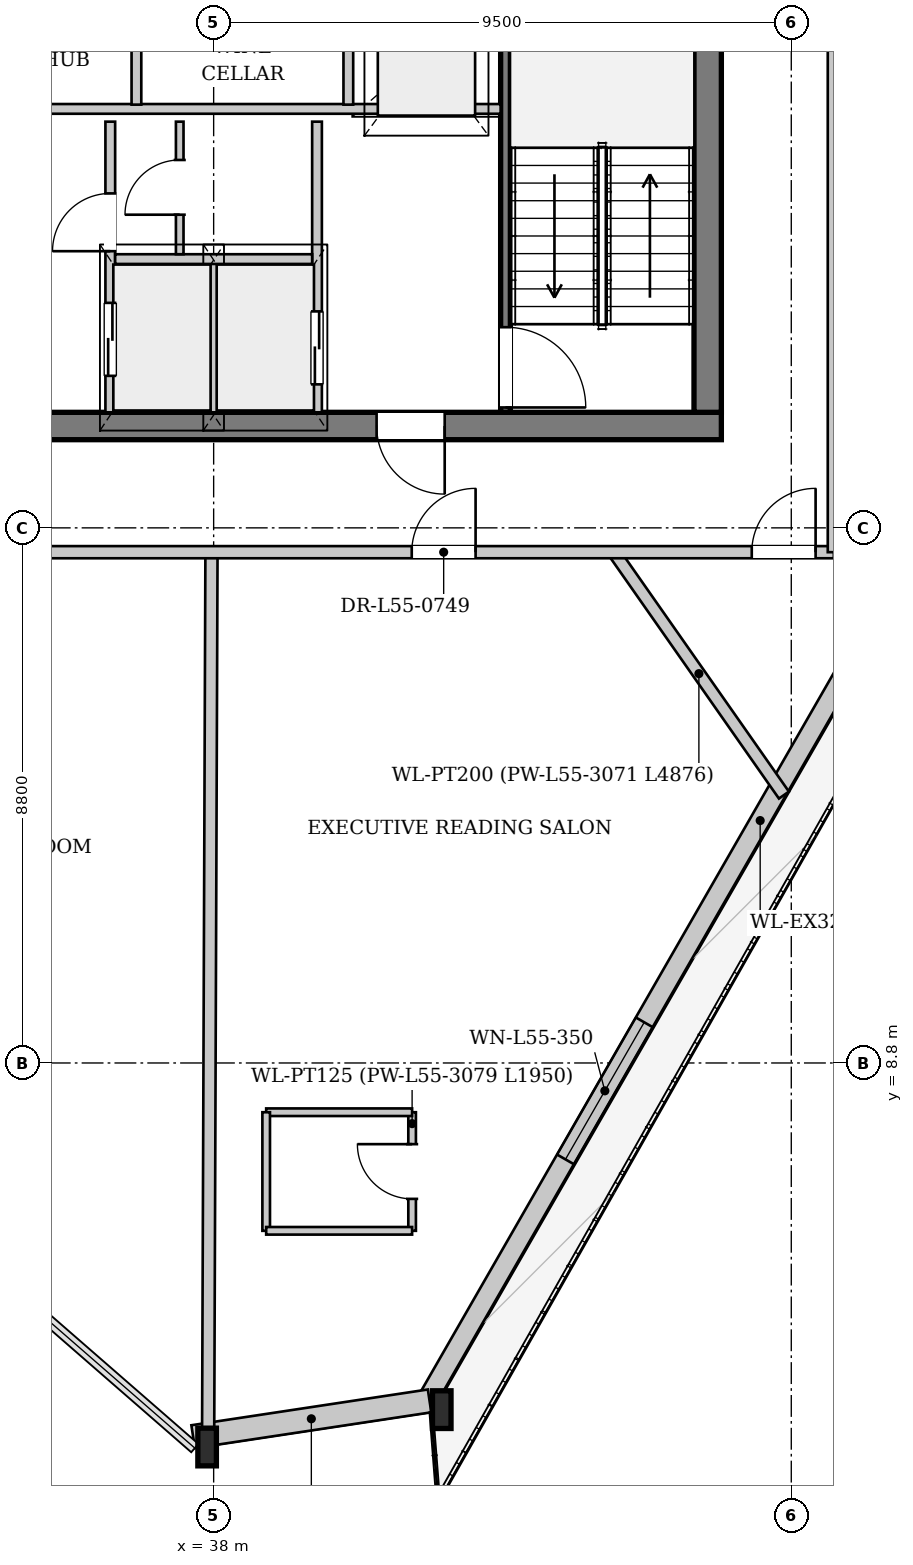
"""IFC4 building model, lengths in metres.
Left out: names, types, materials, properties, quantities, classifications, styles, units other than length and angle.
Written with IfcOpenShell. Run it as: python <this file> out.ifc"""

import sys

from ifc_helpers import new_model, si_unit, direction, frame, frame_2d, origin, origin_2d, place, context, subcontext, project, spatial, rectangle, i_section, extrude, source, transform, mapped, element, fill, save


model = new_model("IFC4")
c1 = context("Model", 3, precision=1e-05, world=origin(), true_north=direction((0.0, 1.0)))
c2 = subcontext(c1, "Body", "Model", "MODEL_VIEW")
j1 = project(units=[si_unit("LENGTHUNIT", "METRE"), si_unit("PLANEANGLEUNIT", "RADIAN")], contexts=[c1])
p1 = place(None, origin())
s1 = spatial("IfcSite", under=j1, at=p1, CompositionType="ELEMENT")
p2 = place(p1, origin())
s2 = spatial("IfcBuilding", under=s1, at=p2, CompositionType="ELEMENT")
p3 = place(p2, frame((0.0, 0.0, 209.6)))
s3 = spatial("IfcBuildingStorey", under=s2, at=p3, CompositionType="ELEMENT", Elevation=209.6)
m1 = source(origin(), c2, "Body", "SweptSolid", [
    extrude(i_section(OverallWidth=0.305, OverallDepth=0.62, WebThickness=0.021, FlangeThickness=0.04, at=origin_2d()), origin(), (0.0, 0.0, 1.0), 3.409),
])
p4 = place(p3, frame((37.691, 2.467, 0.0), z_axis=(0.118446662085, 0.010598613052, 0.992903851157), x_axis=(-0.089123966209, 0.996020541278, 0.0)))
e1 = element("IfcColumn", 1, at=p4, inside=s3, PredefinedType="COLUMN", context=c2, shape_type="MappedRepresentation", body=[
    mapped(m1, transform((0.0, 0.0, 0.0), x_axis=(1.0, 0.0, 0.0), y_axis=(0.0, 1.0, 0.0), z_axis=(0.0, 0.0, 1.0), scale=1.0)),
])
m2 = source(origin(), c2, "Body", "SweptSolid", [
    extrude(i_section(OverallWidth=0.305, OverallDepth=0.62, WebThickness=0.021, FlangeThickness=0.04, at=origin_2d()), origin(), (0.0, 0.0, 1.0), 3.404),
])
p5 = place(p3, frame((41.58, 3.055, 0.0), z_axis=(0.100996805181, 0.026038238836, 0.994545954424), x_axis=(-0.249649213063, 0.968336341576, 0.0)))
e2 = element("IfcColumn", 2, at=p5, inside=s3, PredefinedType="COLUMN", context=c2, shape_type="MappedRepresentation", body=[
    mapped(m2, transform((0.0, 0.0, 0.0), x_axis=(1.0, 0.0, 0.0), y_axis=(0.0, 1.0, 0.0), z_axis=(0.0, 0.0, 1.0), scale=1.0)),
])
p6 = place(p3, frame((52.953, 23.164, 0.0), z_axis=(0.0, 0.0, 1.0), x_axis=(-0.498307707731, -0.867000247068, 0.0)))
e3 = element("IfcWall", 3, at=p6, inside=s3, PredefinedType="SOLIDWALL", context=c2, shape_type="SweptSolid", body=[
    extrude(rectangle(XDim=23.102, YDim=0.32, at=frame_2d((11.551, 0.0))), origin(), (0.0, 0.0, 1.0), 2.822),
])
p7 = place(p6, frame((6.643, 0.0, 0.0)))
e4 = element("IfcOpeningElement", 4, at=p7, cuts=e3, PredefinedType="OPENING", context=c2, shape_type="SweptSolid", body=[
    extrude(rectangle(XDim=1.5, YDim=2.3, at=frame_2d((0.75, 1.15))), frame((0.0, 0.17, 0.0), z_axis=(0.0, -1.0, 0.0), x_axis=(1.0, 0.0, 0.0)), (0.0, 0.0, 1.0), 0.34),
])
p8 = place(p6, frame((15.796, 0.0, 0.352)))
e5 = element("IfcOpeningElement", 5, at=p8, cuts=e3, PredefinedType="OPENING", context=c2, shape_type="SweptSolid", body=[
    extrude(rectangle(XDim=2.6, YDim=2.35, at=frame_2d((1.3, 1.175))), frame((0.0, 0.17, 0.0), z_axis=(0.0, -1.0, 0.0), x_axis=(1.0, 0.0, 0.0)), (0.0, 0.0, 1.0), 0.34),
])
p9 = place(p3, frame((41.551, 3.243, 0.0), z_axis=(0.0, 0.0, 1.0), x_axis=(-0.988756700012, -0.149533234373, 0.0)))
e6 = element("IfcWall", 6, at=p9, inside=s3, PredefinedType="SOLIDWALL", context=c2, shape_type="SweptSolid", body=[
    extrude(rectangle(XDim=3.933, YDim=0.38, at=frame_2d((1.967, 0.0))), origin(), (0.0, 0.0, 1.0), 2.822),
])
p10 = place(p3, frame((46.35, 19.275, 0.0), z_axis=(0.0, 0.0, 1.0), x_axis=(-1.0, 0.0, 0.0)))
e7 = element("IfcWall", 7, at=p10, inside=s3, PredefinedType="SHEAR", context=c2, shape_type="SweptSolid", body=[
    extrude(rectangle(XDim=16.7, YDim=0.45, at=frame_2d((8.35, 0.0))), origin(), (0.0, 0.0, 1.0), 3.33),
])
p11 = place(p10, frame((4.55, 0.0, 0.0)))
e8 = element("IfcOpeningElement", 8, at=p11, cuts=e7, PredefinedType="OPENING", context=c2, shape_type="SweptSolid", body=[
    extrude(rectangle(XDim=1.12, YDim=2.25, at=frame_2d((0.56, 1.125))), frame((0.0, 0.235, 0.0), z_axis=(0.0, -1.0, 0.0), x_axis=(1.0, 0.0, 0.0)), (0.0, 0.0, 1.0), 0.47),
])
p12 = place(p10, frame((11.05, 0.0, 0.0)))
e9 = element("IfcOpeningElement", 9, at=p12, cuts=e7, PredefinedType="OPENING", context=c2, shape_type="SweptSolid", body=[
    extrude(rectangle(XDim=1.12, YDim=2.25, at=frame_2d((0.56, 1.125))), frame((0.0, 0.235, 0.0), z_axis=(0.0, -1.0, 0.0), x_axis=(1.0, 0.0, 0.0)), (0.0, 0.0, 1.0), 0.47),
])
p13 = place(p3, frame((46.125, 33.7, 0.0), z_axis=(0.0, 0.0, 1.0), x_axis=(0.0, -1.0, 0.0)))
e10 = element("IfcWall", 10, at=p13, inside=s3, PredefinedType="SHEAR", context=c2, shape_type="SweptSolid", body=[
    extrude(rectangle(XDim=14.2, YDim=0.45, at=frame_2d((7.1, 0.0))), origin(), (0.0, 0.0, 1.0), 3.33),
])
p14 = place(p13, frame((5.18, 0.0, 0.0)))
e11 = element("IfcOpeningElement", 11, at=p14, cuts=e10, PredefinedType="OPENING", context=c2, shape_type="SweptSolid", body=[
    extrude(rectangle(XDim=1.6, YDim=2.2, at=frame_2d((0.8, 1.1))), frame((0.0, 0.235, 0.0), z_axis=(0.0, -1.0, 0.0), x_axis=(1.0, 0.0, 0.0)), (0.0, 0.0, 1.0), 0.47),
])
p15 = place(p13, frame((2.05, 0.0, 0.0)))
e12 = element("IfcOpeningElement", 12, at=p15, cuts=e10, PredefinedType="OPENING", context=c2, shape_type="SweptSolid", body=[
    extrude(rectangle(XDim=0.95, YDim=2.1, at=frame_2d((0.475, 1.05))), frame((0.0, 0.235, 0.0), z_axis=(0.0, -1.0, 0.0), x_axis=(1.0, 0.0, 0.0)), (0.0, 0.0, 1.0), 0.47),
])
p16 = place(p3, frame((42.8, 26.96, 0.0), z_axis=(0.0, 0.0, 1.0), x_axis=(0.0, -1.0, 0.0)))
e13 = element("IfcWall", 13, at=p16, inside=s3, PredefinedType="PARTITIONING", context=c2, shape_type="SweptSolid", body=[
    extrude(rectangle(XDim=7.46, YDim=0.16, at=frame_2d((3.73, 0.0))), origin(), (0.0, 0.0, 1.0), 3.33),
])
p17 = place(p16, frame((6.06, 0.0, 0.0)))
e14 = element("IfcOpeningElement", 14, at=p17, cuts=e13, PredefinedType="OPENING", context=c2, shape_type="SweptSolid", body=[
    extrude(rectangle(XDim=1.32, YDim=2.2, at=frame_2d((0.66, 1.1))), frame((0.0, 0.09, 0.0), z_axis=(0.0, -1.0, 0.0), x_axis=(1.0, 0.0, 0.0)), (0.0, 0.0, 1.0), 0.18),
])
p18 = place(p3, frame((36.3, 19.5, 0.0), z_axis=(0.0, 0.0, 1.0), x_axis=(0.0, 1.0, 0.0)))
e15 = element("IfcWall", 15, at=p18, inside=s3, PredefinedType="PARTITIONING", context=c2, shape_type="SweptSolid", body=[
    extrude(rectangle(XDim=4.78, YDim=0.16, at=frame_2d((2.39, 0.0))), origin(), (0.0, 0.0, 1.0), 3.33),
])
p19 = place(p18, frame((0.6, 0.0, 0.0)))
e16 = element("IfcOpeningElement", 16, at=p19, cuts=e15, PredefinedType="OPENING", context=c2, shape_type="SweptSolid", body=[
    extrude(rectangle(XDim=1.2, YDim=2.2, at=frame_2d((0.6, 1.1))), frame((0.0, 0.09, 0.0), z_axis=(0.0, -1.0, 0.0), x_axis=(1.0, 0.0, 0.0)), (0.0, 0.0, 1.0), 0.18),
])
p20 = place(p18, frame((2.65, 0.0, 0.0)))
e17 = element("IfcOpeningElement", 17, at=p20, cuts=e15, PredefinedType="OPENING", context=c2, shape_type="SweptSolid", body=[
    extrude(rectangle(XDim=0.95, YDim=2.1, at=frame_2d((0.475, 1.05))), frame((0.0, 0.09, 0.0), z_axis=(0.0, -1.0, 0.0), x_axis=(1.0, 0.0, 0.0)), (0.0, 0.0, 1.0), 0.18),
])
p21 = place(p3, frame((39.7, 24.28, 0.0), z_axis=(0.0, 0.0, 1.0), x_axis=(0.0, -1.0, 0.0)))
e18 = element("IfcWall", 18, at=p21, inside=s3, PredefinedType="PARTITIONING", context=c2, shape_type="SweptSolid", body=[
    extrude(rectangle(XDim=4.78, YDim=0.16, at=frame_2d((2.39, 0.0))), origin(), (0.0, 0.0, 1.0), 3.33),
])
p22 = place(p21, frame((3.12, 0.0, 0.0)))
e19 = element("IfcOpeningElement", 19, at=p22, cuts=e18, PredefinedType="OPENING", context=c2, shape_type="SweptSolid", body=[
    extrude(rectangle(XDim=1.2, YDim=2.2, at=frame_2d((0.6, 1.1))), frame((0.0, 0.09, 0.0), z_axis=(0.0, -1.0, 0.0), x_axis=(1.0, 0.0, 0.0)), (0.0, 0.0, 1.0), 0.18),
])
p23 = place(p3, frame((38.0, 19.5, 0.0), z_axis=(0.0, 0.0, 1.0), x_axis=(0.0, 1.0, 0.0)))
e20 = element("IfcWall", 20, at=p23, inside=s3, PredefinedType="PARTITIONING", context=c2, shape_type="SweptSolid", body=[
    extrude(rectangle(XDim=2.46, YDim=0.125, at=frame_2d((1.23, 0.0))), origin(), (0.0, 0.0, 1.0), 3.33),
])
p24 = place(p3, frame((36.38, 22.02, 0.0), z_axis=(0.0, 0.0, 1.0), x_axis=(1.0, 0.0, 0.0)))
e21 = element("IfcWall", 21, at=p24, inside=s3, PredefinedType="PARTITIONING", context=c2, shape_type="SweptSolid", body=[
    extrude(rectangle(XDim=3.24, YDim=0.16, at=frame_2d((1.62, 0.0))), origin(), (0.0, 0.0, 1.0), 3.33),
])
p25 = place(p3, frame((33.28, 24.49, 0.0), z_axis=(0.0, 0.0, 1.0), x_axis=(1.0, 0.0, 0.0)))
e22 = element("IfcWall", 22, at=p25, inside=s3, PredefinedType="PARTITIONING", context=c2, shape_type="SweptSolid", body=[
    extrude(rectangle(XDim=9.44, YDim=0.16, at=frame_2d((4.72, 0.0))), origin(), (0.0, 0.0, 1.0), 3.33),
])
p26 = place(p3, frame((37.442, 22.1, 0.0), z_axis=(0.0, 0.0, 1.0), x_axis=(0.0, 1.0, 0.0)))
e23 = element("IfcWall", 23, at=p26, inside=s3, PredefinedType="PARTITIONING", context=c2, shape_type="SweptSolid", body=[
    extrude(rectangle(XDim=2.18, YDim=0.125, at=frame_2d((1.09, 0.0))), origin(), (0.0, 0.0, 1.0), 3.33),
])
p27 = place(p26, frame((0.65, 0.0, 0.0)))
e24 = element("IfcOpeningElement", 24, at=p27, cuts=e23, PredefinedType="OPENING", context=c2, shape_type="SweptSolid", body=[
    extrude(rectangle(XDim=0.9, YDim=2.1, at=frame_2d((0.45, 1.05))), frame((0.0, 0.073, 0.0), z_axis=(0.0, -1.0, 0.0), x_axis=(1.0, 0.0, 0.0)), (0.0, 0.0, 1.0), 0.145),
])
for number, where, z_axis, x_axis in (
    (25, (36.73, 24.56, 0.0), (0.0, 0.0, 1.0), (0.0, 1.0, 0.0)),
    (26, (40.215, 24.56, 0.0), (0.0, 0.0, 1.0), (0.0, 1.0, 0.0)),
):
    element("IfcWall", number, at=place(p3, frame(where, z_axis=z_axis, x_axis=x_axis)), inside=s3, PredefinedType="PARTITIONING", context=c2, shape_type="SweptSolid", body=[
        extrude(rectangle(XDim=2.31, YDim=0.16, at=frame_2d((1.155, 0.0))), origin(), (0.0, 0.0, 1.0), 3.33),
    ])
p28 = place(p3, frame((44.582, 17.2, 0.0), z_axis=(0.0, 0.0, 1.0), x_axis=(0.573549703619, -0.8191707621, 0.0)))
e27 = element("IfcWall", 27, at=p28, inside=s3, PredefinedType="PARTITIONING", context=c2, shape_type="SweptSolid", body=[
    extrude(rectangle(XDim=4.876, YDim=0.2, at=frame_2d((2.438, 0.0))), origin(), (0.0, 0.0, 1.0), 3.33),
])
p29 = place(p3, frame((37.964, 17.2, 0.0), z_axis=(0.0, 0.0, 1.0), x_axis=(-0.003794344368, -0.999992801449, 0.0)))
e28 = element("IfcWall", 28, at=p29, inside=s3, PredefinedType="PARTITIONING", context=c2, shape_type="SweptSolid", body=[
    extrude(rectangle(XDim=14.67, YDim=0.2, at=frame_2d((7.335, 0.0))), origin(), (0.0, 0.0, 1.0), 2.925),
])
p30 = place(p3, frame((41.264, 6.04, 0.0), z_axis=(0.0, 0.0, 1.0), x_axis=(0.0, 1.0, 0.0)))
e29 = element("IfcWall", 29, at=p30, inside=s3, PredefinedType="PARTITIONING", context=c2, shape_type="SweptSolid", body=[
    extrude(rectangle(XDim=1.95, YDim=0.125, at=frame_2d((0.975, 0.0))), origin(), (0.0, 0.0, 1.0), 2.925),
])
p31 = place(p30, frame((0.525, 0.0, 0.0)))
e30 = element("IfcOpeningElement", 30, at=p31, cuts=e29, PredefinedType="OPENING", context=c2, shape_type="SweptSolid", body=[
    extrude(rectangle(XDim=0.9, YDim=2.1, at=frame_2d((0.45, 1.05))), frame((0.0, 0.073, 0.0), z_axis=(0.0, -1.0, 0.0), x_axis=(1.0, 0.0, 0.0)), (0.0, 0.0, 1.0), 0.145),
])
p32 = place(p3, frame((41.264, 7.99, 0.0), z_axis=(0.0, 0.0, 1.0), x_axis=(-1.0, 0.0, 0.0)))
e31 = element("IfcWall", 31, at=p32, inside=s3, PredefinedType="PARTITIONING", context=c2, shape_type="SweptSolid", body=[
    extrude(rectangle(XDim=2.4, YDim=0.125, at=frame_2d((1.2, 0.0))), origin(), (0.0, 0.0, 1.0), 3.33),
])
p33 = place(p3, frame((38.864, 7.99, 0.0), z_axis=(0.0, 0.0, 1.0), x_axis=(0.0, -1.0, 0.0)))
e32 = element("IfcWall", 32, at=p33, inside=s3, PredefinedType="PARTITIONING", context=c2, shape_type="SweptSolid", body=[
    extrude(rectangle(XDim=1.95, YDim=0.125, at=frame_2d((0.975, 0.0))), origin(), (0.0, 0.0, 1.0), 3.33),
])
p34 = place(p3, frame((38.864, 6.04, 0.0), z_axis=(0.0, 0.0, 1.0), x_axis=(1.0, 0.0, 0.0)))
e33 = element("IfcWall", 33, at=p34, inside=s3, PredefinedType="PARTITIONING", context=c2, shape_type="SweptSolid", body=[
    extrude(rectangle(XDim=2.4, YDim=0.125, at=frame_2d((1.2, 0.0))), origin(), (0.0, 0.0, 1.0), 3.33),
])
p35 = place(p3, frame((27.8, 17.2, 0.0), z_axis=(0.0, 0.0, 1.0), x_axis=(1.0, 0.0, 0.0)))
e34 = element("IfcWall", 34, at=p35, inside=s3, PredefinedType="PARTITIONING", context=c2, shape_type="SweptSolid", body=[
    extrude(rectangle(XDim=20.4, YDim=0.2, at=frame_2d((10.2, 0.0))), origin(), (0.0, 0.0, 1.0), 3.33),
])
p36 = place(p35, frame((19.05, 0.0, 0.0)))
e35 = element("IfcOpeningElement", 35, at=p36, cuts=e34, PredefinedType="OPENING", context=c2, shape_type="SweptSolid", body=[
    extrude(rectangle(XDim=1.05, YDim=2.2, at=frame_2d((0.525, 1.1))), frame((0.0, 0.11, 0.0), z_axis=(0.0, -1.0, 0.0), x_axis=(1.0, 0.0, 0.0)), (0.0, 0.0, 1.0), 0.22),
])
p37 = place(p35, frame((6.236, 0.0, 0.0)))
e36 = element("IfcOpeningElement", 36, at=p37, cuts=e34, PredefinedType="OPENING", context=c2, shape_type="SweptSolid", body=[
    extrude(rectangle(XDim=1.05, YDim=2.2, at=frame_2d((0.525, 1.1))), frame((0.0, 0.11, 0.0), z_axis=(0.0, -1.0, 0.0), x_axis=(1.0, 0.0, 0.0)), (0.0, 0.0, 1.0), 0.22),
])
p38 = place(p35, frame((13.458, 0.0, 0.0)))
e37 = element("IfcOpeningElement", 37, at=p38, cuts=e34, PredefinedType="OPENING", context=c2, shape_type="SweptSolid", body=[
    extrude(rectangle(XDim=1.05, YDim=2.2, at=frame_2d((0.525, 1.1))), frame((0.0, 0.11, 0.0), z_axis=(0.0, -1.0, 0.0), x_axis=(1.0, 0.0, 0.0)), (0.0, 0.0, 1.0), 0.22),
])
p39 = place(p3, frame((48.2, 17.2, 0.0), z_axis=(0.0, 0.0, 1.0), x_axis=(0.0, 1.0, 0.0)))
e38 = element("IfcWall", 38, at=p39, inside=s3, PredefinedType="PARTITIONING", context=c2, shape_type="SweptSolid", body=[
    extrude(rectangle(XDim=18.8, YDim=0.2, at=frame_2d((9.4, 0.0))), origin(), (0.0, 0.0, 1.0), 3.33),
])
p40 = place(p39, frame((17.45, 0.0, 0.0)))
e39 = element("IfcOpeningElement", 39, at=p40, cuts=e38, PredefinedType="OPENING", context=c2, shape_type="SweptSolid", body=[
    extrude(rectangle(XDim=1.05, YDim=2.2, at=frame_2d((0.525, 1.1))), frame((0.0, 0.11, 0.0), z_axis=(0.0, -1.0, 0.0), x_axis=(1.0, 0.0, 0.0)), (0.0, 0.0, 1.0), 0.22),
])
m3 = source(origin(), c2, "Body", "SweptSolid", [
    extrude(rectangle(XDim=2.6, YDim=2.35, at=frame_2d((1.3, 1.175))), frame((0.0, 0.03, 0.0), z_axis=(0.0, -1.0, 0.0), x_axis=(1.0, 0.0, 0.0)), (0.0, 0.0, 1.0), 0.06),
])
p41 = place(p8, origin())
e40 = element("IfcWindow", 40, at=p41, inside=s3, PartitioningType="SINGLE_PANEL", PredefinedType="WINDOW", context=c2, shape_type="MappedRepresentation", body=[
    mapped(m3, transform((0.0, 0.0, 0.0), x_axis=(1.0, 0.0, 0.0), y_axis=(0.0, 1.0, 0.0), z_axis=(0.0, 0.0, 1.0), scale=1.0)),
])
fill(e5, e40)
m4 = source(origin(), c2, "Body", "SweptSolid", [
    extrude(rectangle(XDim=1.12, YDim=2.25, at=frame_2d((0.56, 1.125))), frame((0.0, 0.025, 0.0), z_axis=(0.0, -1.0, 0.0), x_axis=(1.0, 0.0, 0.0)), (0.0, 0.0, 1.0), 0.05),
])
p42 = place(p11, origin())
e41 = element("IfcDoor", 41, at=p42, inside=s3, OperationType="SINGLE_SWING_LEFT", PredefinedType="DOOR", context=c2, shape_type="MappedRepresentation", body=[
    mapped(m4, transform((0.0, 0.0, 0.0), x_axis=(1.0, 0.0, 0.0), y_axis=(0.0, 1.0, 0.0), z_axis=(0.0, 0.0, 1.0), scale=1.0)),
])
fill(e8, e41)
m5 = source(origin(), c2, "Body", "SweptSolid", [
    extrude(rectangle(XDim=1.32, YDim=2.2, at=frame_2d((0.66, 1.1))), frame((0.0, 0.025, 0.0), z_axis=(0.0, -1.0, 0.0), x_axis=(1.0, 0.0, 0.0)), (0.0, 0.0, 1.0), 0.05),
])
p43 = place(p17, origin())
e42 = element("IfcDoor", 42, at=p43, inside=s3, OperationType="SINGLE_SWING_RIGHT", PredefinedType="DOOR", context=c2, shape_type="MappedRepresentation", body=[
    mapped(m5, transform((0.0, 0.0, 0.0), x_axis=(1.0, 0.0, 0.0), y_axis=(0.0, 1.0, 0.0), z_axis=(0.0, 0.0, 1.0), scale=1.0)),
])
fill(e14, e42)
m6 = source(origin(), c2, "Body", "SweptSolid", [
    extrude(rectangle(XDim=1.2, YDim=2.2, at=frame_2d((0.6, 1.1))), frame((0.0, 0.025, 0.0), z_axis=(0.0, -1.0, 0.0), x_axis=(1.0, 0.0, 0.0)), (0.0, 0.0, 1.0), 0.05),
])
p44 = place(p19, origin())
e43 = element("IfcDoor", 43, at=p44, inside=s3, OperationType="DOUBLE_DOOR_SLIDING", PredefinedType="DOOR", context=c2, shape_type="MappedRepresentation", body=[
    mapped(m6, transform((0.0, 0.0, 0.0), x_axis=(1.0, 0.0, 0.0), y_axis=(0.0, 1.0, 0.0), z_axis=(0.0, 0.0, 1.0), scale=1.0)),
])
fill(e16, e43)
m7 = source(origin(), c2, "Body", "SweptSolid", [
    extrude(rectangle(XDim=0.95, YDim=2.1, at=frame_2d((0.475, 1.05))), frame((0.0, 0.025, 0.0), z_axis=(0.0, -1.0, 0.0), x_axis=(1.0, 0.0, 0.0)), (0.0, 0.0, 1.0), 0.05),
])
p45 = place(p20, origin())
e44 = element("IfcDoor", 44, at=p45, inside=s3, OperationType="SINGLE_SWING_LEFT", PredefinedType="DOOR", context=c2, shape_type="MappedRepresentation", body=[
    mapped(m7, transform((0.0, 0.0, 0.0), x_axis=(1.0, 0.0, 0.0), y_axis=(0.0, 1.0, 0.0), z_axis=(0.0, 0.0, 1.0), scale=1.0)),
])
fill(e17, e44)
m8 = source(origin(), c2, "Body", "SweptSolid", [
    extrude(rectangle(XDim=0.9, YDim=2.1, at=frame_2d((0.45, 1.05))), frame((0.0, 0.025, 0.0), z_axis=(0.0, -1.0, 0.0), x_axis=(1.0, 0.0, 0.0)), (0.0, 0.0, 1.0), 0.05),
])
p46 = place(p27, origin())
e45 = element("IfcDoor", 45, at=p46, inside=s3, OperationType="SINGLE_SWING_LEFT", PredefinedType="DOOR", context=c2, shape_type="MappedRepresentation", body=[
    mapped(m8, transform((0.0, 0.0, 0.0), x_axis=(1.0, 0.0, 0.0), y_axis=(0.0, 1.0, 0.0), z_axis=(0.0, 0.0, 1.0), scale=1.0)),
])
fill(e24, e45)
p47 = place(p22, origin())
e46 = element("IfcDoor", 46, at=p47, inside=s3, OperationType="DOUBLE_DOOR_SLIDING", PredefinedType="DOOR", context=c2, shape_type="MappedRepresentation", body=[
    mapped(m6, transform((0.0, 0.0, 0.0), x_axis=(1.0, 0.0, 0.0), y_axis=(0.0, 1.0, 0.0), z_axis=(0.0, 0.0, 1.0), scale=1.0)),
])
fill(e19, e46)
p48 = place(p31, origin())
e47 = element("IfcDoor", 47, at=p48, inside=s3, OperationType="SINGLE_SWING_RIGHT", PredefinedType="DOOR", context=c2, shape_type="MappedRepresentation", body=[
    mapped(m8, transform((0.0, 0.0, 0.0), x_axis=(1.0, 0.0, 0.0), y_axis=(0.0, 1.0, 0.0), z_axis=(0.0, 0.0, 1.0), scale=1.0)),
])
fill(e30, e47)
m9 = source(origin(), c2, "Body", "SweptSolid", [
    extrude(rectangle(XDim=1.05, YDim=2.2, at=frame_2d((0.525, 1.1))), frame((0.0, 0.025, 0.0), z_axis=(0.0, -1.0, 0.0), x_axis=(1.0, 0.0, 0.0)), (0.0, 0.0, 1.0), 0.05),
])
p49 = place(p36, origin())
e48 = element("IfcDoor", 48, at=p49, inside=s3, OperationType="SINGLE_SWING_RIGHT", PredefinedType="DOOR", context=c2, shape_type="MappedRepresentation", body=[
    mapped(m9, transform((0.0, 0.0, 0.0), x_axis=(1.0, 0.0, 0.0), y_axis=(0.0, 1.0, 0.0), z_axis=(0.0, 0.0, 1.0), scale=1.0)),
])
fill(e35, e48)
p50 = place(p38, origin())
e49 = element("IfcDoor", 49, at=p50, inside=s3, OperationType="SINGLE_SWING_RIGHT", PredefinedType="DOOR", context=c2, shape_type="MappedRepresentation", body=[
    mapped(m9, transform((0.0, 0.0, 0.0), x_axis=(1.0, 0.0, 0.0), y_axis=(0.0, 1.0, 0.0), z_axis=(0.0, 0.0, 1.0), scale=1.0)),
])
fill(e37, e49)
save(model, sys.argv[1])
